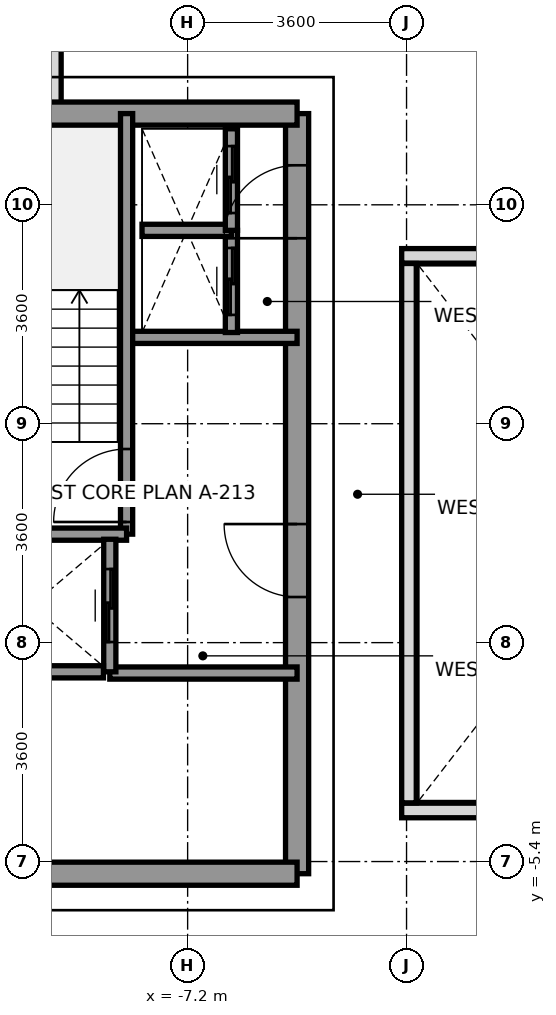
"""IFC4 building model, lengths in metres.
Left out: names, types, materials, properties, quantities, classifications, styles, units other than length and angle.
Written with IfcOpenShell. Run it as: python <this file> out.ifc"""

import sys

from ifc_helpers import new_model, si_unit, direction, frame, frame_2d, origin, place, context, subcontext, project, spatial, rectangle, extrude, source, transform, mapped, element, fill, save


model = new_model("IFC4")
c1 = context("Model", 3, precision=1e-05, world=origin(), true_north=direction((0.0, 1.0)))
c2 = subcontext(c1, "Body", "Model", "MODEL_VIEW")
j1 = project(units=[si_unit("LENGTHUNIT", "METRE"), si_unit("PLANEANGLEUNIT", "RADIAN")], contexts=[c1])
p1 = place(None, origin())
s1 = spatial("IfcSite", under=j1, at=p1, CompositionType="ELEMENT")
p2 = place(p1, origin())
s2 = spatial("IfcBuilding", under=s1, at=p2, CompositionType="ELEMENT")
p3 = place(p2, frame((0.0, 0.0, 197.8)))
s3 = spatial("IfcBuildingStorey", under=s2, at=p3, CompositionType="ELEMENT", Elevation=197.8)
p4 = place(p3, frame((-9.4, 6.953, 0.0), z_axis=(0.0, 0.0, 1.0), x_axis=(0.0, 1.0, 0.0)))
e1 = element("IfcWall", 1, at=p4, inside=s3, PredefinedType="PARAPET", context=c2, shape_type="SweptSolid", body=[
    extrude(rectangle(XDim=1.594, YDim=0.24, at=frame_2d((0.797, 0.0))), origin(), (0.0, 0.0, 1.0), 1.15),
])
p5 = place(p3, frame((-5.4, -5.6, 0.0), z_axis=(0.0, 0.0, 1.0), x_axis=(0.0, 1.0, 0.0)))
e2 = element("IfcWall", 2, at=p5, inside=s3, PredefinedType="SHEAR", context=c2, shape_type="SweptSolid", body=[
    extrude(rectangle(XDim=12.5, YDim=0.38, at=frame_2d((6.25, 0.0))), origin(), (0.0, 0.0, 1.0), 3.2),
])
p6 = place(p5, frame((4.55, 0.0, 0.0)))
e3 = element("IfcOpeningElement", 3, at=p6, cuts=e2, PredefinedType="OPENING", context=c2, shape_type="SweptSolid", body=[
    extrude(rectangle(XDim=1.2, YDim=2.2, at=frame_2d((0.6, 1.1))), frame((0.0, 0.2, 0.0), z_axis=(0.0, -1.0, 0.0), x_axis=(1.0, 0.0, 0.0)), (0.0, 0.0, 1.0), 0.4),
])
p7 = place(p5, frame((10.45, 0.0, 0.0)))
e4 = element("IfcOpeningElement", 4, at=p7, cuts=e2, PredefinedType="OPENING", context=c2, shape_type="SweptSolid", body=[
    extrude(rectangle(XDim=1.2, YDim=2.2, at=frame_2d((0.6, 1.1))), frame((0.0, 0.2, 0.0), z_axis=(0.0, -1.0, 0.0), x_axis=(1.0, 0.0, 0.0)), (0.0, 0.0, 1.0), 0.4),
])
p8 = place(p3, frame((-11.356, 6.9, 0.0), z_axis=(0.0, 0.0, 1.0), x_axis=(1.0, 0.0, 0.0)))
e5 = element("IfcWall", 5, at=p8, inside=s3, PredefinedType="SHEAR", context=c2, shape_type="SweptSolid", body=[
    extrude(rectangle(XDim=5.956, YDim=0.38, at=frame_2d((2.978, 0.0))), origin(), (0.0, 0.0, 1.0), 3.2),
])
p9 = place(p3, frame((-13.2, -5.6, 0.0), z_axis=(0.0, 0.0, 1.0), x_axis=(1.0, 0.0, 0.0)))
e6 = element("IfcWall", 6, at=p9, inside=s3, PredefinedType="SHEAR", context=c2, shape_type="SweptSolid", body=[
    extrude(rectangle(XDim=7.8, YDim=0.38, at=frame_2d((3.9, 0.0))), origin(), (0.0, 0.0, 1.0), 3.2),
])
p10 = place(p3, frame((-8.18, 3.22, 0.0), z_axis=(0.0, 0.0, 1.0), x_axis=(1.0, 0.0, 0.0)))
e7 = element("IfcWall", 7, at=p10, inside=s3, PredefinedType="SOLIDWALL", context=c2, shape_type="SweptSolid", body=[
    extrude(rectangle(XDim=2.78, YDim=0.2, at=frame_2d((1.39, 0.0))), origin(), (0.0, 0.0, 1.0), 3.2),
])
p11 = place(p3, frame((-8.48, -2.3, 0.0), z_axis=(0.0, 0.0, 1.0), x_axis=(1.0, 0.0, 0.0)))
e8 = element("IfcWall", 8, at=p11, inside=s3, PredefinedType="SOLIDWALL", context=c2, shape_type="SweptSolid", body=[
    extrude(rectangle(XDim=3.08, YDim=0.2, at=frame_2d((1.54, 0.0))), origin(), (0.0, 0.0, 1.0), 3.2),
])
p12 = place(p3, frame((-8.204, -0.016, 0.0), z_axis=(0.0, 0.0, 1.0), x_axis=(0.0, 1.0, 0.0)))
e9 = element("IfcWall", 9, at=p12, inside=s3, PredefinedType="SOLIDWALL", context=c2, shape_type="SweptSolid", body=[
    extrude(rectangle(XDim=6.916, YDim=0.2, at=frame_2d((3.458, 0.0))), origin(), (0.0, 0.0, 1.0), 3.2),
])
p13 = place(p12, frame((0.2, 0.0, 0.0)))
e10 = element("IfcOpeningElement", 10, at=p13, cuts=e9, PredefinedType="OPENING", context=c2, shape_type="SweptSolid", body=[
    extrude(rectangle(XDim=1.2, YDim=2.2, at=frame_2d((0.6, 1.1))), frame((0.0, 0.11, 0.0), z_axis=(0.0, -1.0, 0.0), x_axis=(1.0, 0.0, 0.0)), (0.0, 0.0, 1.0), 0.22),
])
p14 = place(p3, frame((-11.356, -0.016, 0.0), z_axis=(0.0, 0.0, 1.0), x_axis=(1.0, 0.0, 0.0)))
e11 = element("IfcWall", 11, at=p14, inside=s3, PredefinedType="SOLIDWALL", context=c2, shape_type="SweptSolid", body=[
    extrude(rectangle(XDim=3.152, YDim=0.2, at=frame_2d((1.576, 0.0))), origin(), (0.0, 0.0, 1.0), 3.2),
])
p15 = place(p3, frame((-8.48, -2.28, 0.0), z_axis=(0.0, 0.0, 1.0), x_axis=(0.0, 1.0, 0.0)))
e12 = element("IfcWall", 12, at=p15, inside=s3, PredefinedType="SOLIDWALL", context=c2, shape_type="SweptSolid", body=[
    extrude(rectangle(XDim=2.18, YDim=0.2, at=frame_2d((1.09, 0.0))), origin(), (0.0, 0.0, 1.0), 3.2),
])
p16 = place(p15, frame((0.49, 0.0, 0.0)))
e13 = element("IfcOpeningElement", 13, at=p16, cuts=e12, PredefinedType="OPENING", context=c2, shape_type="SweptSolid", body=[
    extrude(rectangle(XDim=1.2, YDim=2.2, at=frame_2d((0.6, 1.1))), frame((0.0, 0.11, 0.0), z_axis=(0.0, -1.0, 0.0), x_axis=(1.0, 0.0, 0.0)), (0.0, 0.0, 1.0), 0.22),
])
p17 = place(p3, frame((-10.946, -2.28, 0.0), z_axis=(0.0, 0.0, 1.0), x_axis=(1.0, 0.0, 0.0)))
e14 = element("IfcWall", 14, at=p17, inside=s3, PredefinedType="SOLIDWALL", context=c2, shape_type="SweptSolid", body=[
    extrude(rectangle(XDim=2.362, YDim=0.2, at=frame_2d((1.181, 0.0))), origin(), (0.0, 0.0, 1.0), 3.2),
])
p18 = place(p3, frame((-6.48, 3.3, 0.0), z_axis=(0.0, 0.0, 1.0), x_axis=(0.0, 1.0, 0.0)))
e15 = element("IfcWall", 15, at=p18, inside=s3, PredefinedType="SOLIDWALL", context=c2, shape_type="SweptSolid", body=[
    extrude(rectangle(XDim=1.68, YDim=0.2, at=frame_2d((0.84, 0.0))), origin(), (0.0, 0.0, 1.0), 3.2),
])
p19 = place(p18, frame((0.29, 0.0, 0.0)))
e16 = element("IfcOpeningElement", 16, at=p19, cuts=e15, PredefinedType="OPENING", context=c2, shape_type="SweptSolid", body=[
    extrude(rectangle(XDim=1.1, YDim=2.2, at=frame_2d((0.55, 1.1))), frame((0.0, 0.11, 0.0), z_axis=(0.0, -1.0, 0.0), x_axis=(1.0, 0.0, 0.0)), (0.0, 0.0, 1.0), 0.22),
])
p20 = place(p3, frame((-7.95, 4.98, 0.0), z_axis=(0.0, 0.0, 1.0), x_axis=(1.0, 0.0, 0.0)))
e17 = element("IfcWall", 17, at=p20, inside=s3, PredefinedType="SOLIDWALL", context=c2, shape_type="SweptSolid", body=[
    extrude(rectangle(XDim=1.47, YDim=0.2, at=frame_2d((0.735, 0.0))), origin(), (0.0, 0.0, 1.0), 3.2),
])
p21 = place(p3, frame((-6.48, 4.98, 0.0), z_axis=(0.0, 0.0, 1.0), x_axis=(0.0, 1.0, 0.0)))
e18 = element("IfcWall", 18, at=p21, inside=s3, PredefinedType="SOLIDWALL", context=c2, shape_type="SweptSolid", body=[
    extrude(rectangle(XDim=1.67, YDim=0.2, at=frame_2d((0.835, 0.0))), origin(), (0.0, 0.0, 1.0), 3.2),
])
p22 = place(p21, frame((0.285, 0.0, 0.0)))
e19 = element("IfcOpeningElement", 19, at=p22, cuts=e18, PredefinedType="OPENING", context=c2, shape_type="SweptSolid", body=[
    extrude(rectangle(XDim=1.1, YDim=2.2, at=frame_2d((0.55, 1.1))), frame((0.0, 0.11, 0.0), z_axis=(0.0, -1.0, 0.0), x_axis=(1.0, 0.0, 0.0)), (0.0, 0.0, 1.0), 0.22),
])
for number, where, z_axis, x_axis in (
    (20, (-3.68, -4.56, 0.0), (0.0, 0.0, 1.0), (1.0, 0.0, 0.0)),
    (21, (-3.68, 4.56, 0.0), (0.0, 0.0, 1.0), (1.0, 0.0, 0.0)),
):
    element("IfcWall", number, at=place(p3, frame(where, z_axis=z_axis, x_axis=x_axis)), inside=s3, PredefinedType="PARAPET", context=c2, shape_type="SweptSolid", body=[
        extrude(rectangle(XDim=7.36, YDim=0.24, at=frame_2d((3.68, 0.0))), origin(), (0.0, 0.0, 1.0), 1.15),
    ])
p23 = place(p3, frame((-3.56, -4.435, 0.0), z_axis=(0.0, 0.0, 1.0), x_axis=(0.0, 1.0, 0.0)))
e22 = element("IfcWall", 22, at=p23, inside=s3, PredefinedType="PARAPET", context=c2, shape_type="SweptSolid", body=[
    extrude(rectangle(XDim=8.87, YDim=0.24, at=frame_2d((4.435, 0.0))), origin(), (0.0, 0.0, 1.0), 1.15),
])
m1 = source(origin(), c2, "Body", "SweptSolid", [
    extrude(rectangle(XDim=1.2, YDim=2.2, at=frame_2d((0.6, 1.1))), frame((0.0, 0.025, 0.0), z_axis=(0.0, -1.0, 0.0), x_axis=(1.0, 0.0, 0.0)), (0.0, 0.0, 1.0), 0.05),
])
p24 = place(p13, origin())
e23 = element("IfcDoor", 23, at=p24, inside=s3, OperationType="SINGLE_SWING_LEFT", PredefinedType="DOOR", context=c2, shape_type="MappedRepresentation", body=[
    mapped(m1, transform((0.0, 0.0, 0.0), x_axis=(1.0, 0.0, 0.0), y_axis=(0.0, 1.0, 0.0), z_axis=(0.0, 0.0, 1.0), scale=1.0)),
])
fill(e10, e23)
p25 = place(p6, origin())
e24 = element("IfcDoor", 24, at=p25, inside=s3, OperationType="SINGLE_SWING_RIGHT", PredefinedType="DOOR", context=c2, shape_type="MappedRepresentation", body=[
    mapped(m1, transform((0.0, 0.0, 0.0), x_axis=(1.0, 0.0, 0.0), y_axis=(0.0, 1.0, 0.0), z_axis=(0.0, 0.0, 1.0), scale=1.0)),
])
fill(e3, e24)
p26 = place(p7, origin())
e25 = element("IfcDoor", 25, at=p26, inside=s3, OperationType="SINGLE_SWING_LEFT", PredefinedType="DOOR", context=c2, shape_type="MappedRepresentation", body=[
    mapped(m1, transform((0.0, 0.0, 0.0), x_axis=(1.0, 0.0, 0.0), y_axis=(0.0, 1.0, 0.0), z_axis=(0.0, 0.0, 1.0), scale=1.0)),
])
fill(e4, e25)
p27 = place(p16, origin())
e26 = element("IfcDoor", 26, at=p27, inside=s3, OperationType="SLIDING_TO_RIGHT", PredefinedType="DOOR", context=c2, shape_type="MappedRepresentation", body=[
    mapped(m1, transform((0.0, 0.0, 0.0), x_axis=(1.0, 0.0, 0.0), y_axis=(0.0, 1.0, 0.0), z_axis=(0.0, 0.0, 1.0), scale=1.0)),
])
fill(e13, e26)
m2 = source(origin(), c2, "Body", "SweptSolid", [
    extrude(rectangle(XDim=1.1, YDim=2.2, at=frame_2d((0.55, 1.1))), frame((0.0, 0.025, 0.0), z_axis=(0.0, -1.0, 0.0), x_axis=(1.0, 0.0, 0.0)), (0.0, 0.0, 1.0), 0.05),
])
p28 = place(p19, origin())
e27 = element("IfcDoor", 27, at=p28, inside=s3, OperationType="SLIDING_TO_LEFT", PredefinedType="DOOR", context=c2, shape_type="MappedRepresentation", body=[
    mapped(m2, transform((0.0, 0.0, 0.0), x_axis=(1.0, 0.0, 0.0), y_axis=(0.0, 1.0, 0.0), z_axis=(0.0, 0.0, 1.0), scale=1.0)),
])
fill(e16, e27)
p29 = place(p22, origin())
e28 = element("IfcDoor", 28, at=p29, inside=s3, OperationType="SLIDING_TO_LEFT", PredefinedType="DOOR", context=c2, shape_type="MappedRepresentation", body=[
    mapped(m2, transform((0.0, 0.0, 0.0), x_axis=(1.0, 0.0, 0.0), y_axis=(0.0, 1.0, 0.0), z_axis=(0.0, 0.0, 1.0), scale=1.0)),
])
fill(e19, e28)
save(model, sys.argv[1])
